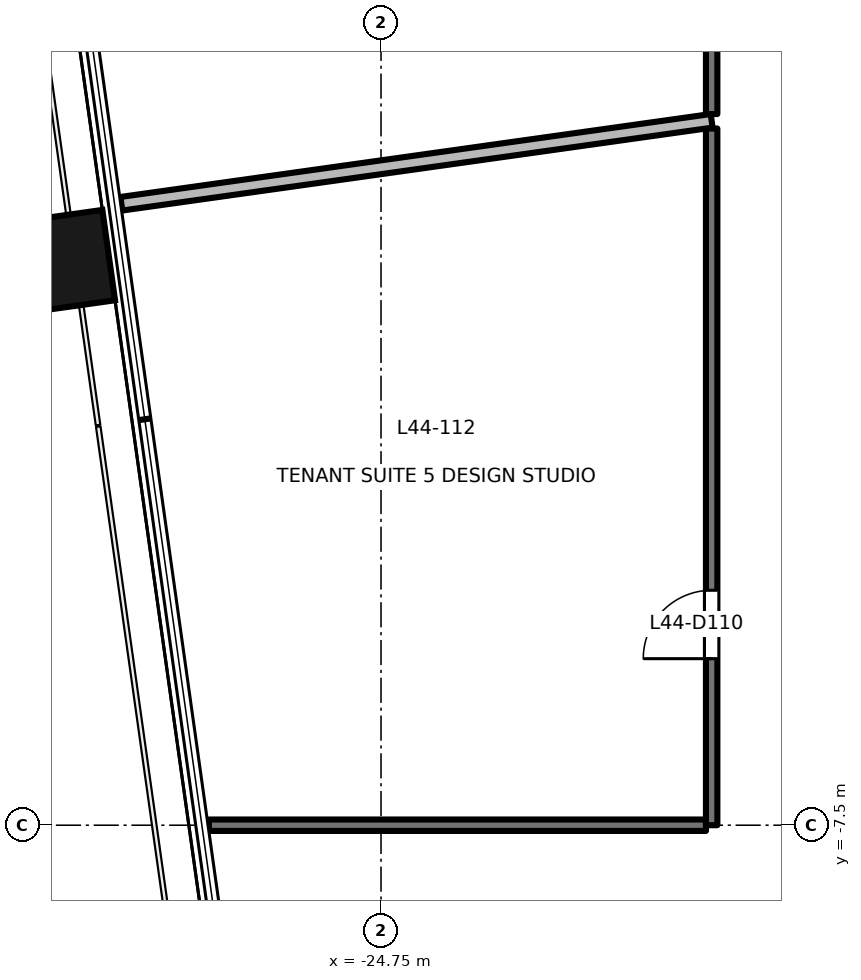
"""IFC4 building model, lengths in metres.
Left out: names, types, materials, properties, quantities, classifications, styles, units other than length and angle.
Written with IfcOpenShell. Run it as: python <this file> out.ifc"""

import sys

from ifc_helpers import new_model, si_unit, direction, frame, frame_2d, origin, origin_2d, place, context, subcontext, project, spatial, rectangle, extrude, element, fill, save


model = new_model("IFC4")
c1 = context("Model", 3, precision=1e-05, world=origin(), true_north=direction((0.0, 1.0)))
c2 = subcontext(c1, "Body", "Model", "MODEL_VIEW")
j1 = project(units=[si_unit("LENGTHUNIT", "METRE"), si_unit("PLANEANGLEUNIT", "RADIAN")], contexts=[c1])
p1 = place(None, origin())
s1 = spatial("IfcSite", under=j1, at=p1, CompositionType="ELEMENT")
p2 = place(p1, origin())
s2 = spatial("IfcBuilding", under=s1, at=p2, CompositionType="ELEMENT")
p3 = place(p2, frame((0.0, 0.0, 191.9)))
s3 = spatial("IfcBuildingStorey", under=s2, at=p3, CompositionType="ELEMENT", Elevation=191.9)
p4 = place(p3, frame((-29.224, -0.125, -0.2), z_axis=(0.0, 0.0, 1.0), x_axis=(-0.139190384377, 0.990265639562, 0.0)))
e1 = element("IfcColumn", 1, at=p4, inside=s3, PredefinedType="COLUMN", context=c2, shape_type="SweptSolid", body=[
    extrude(rectangle(XDim=1.2, YDim=1.8, at=origin_2d()), origin(), (0.0, 0.0, 1.0), 3.9),
])
p5 = place(p3, frame((-27.015, -7.5, 0.0), z_axis=(0.0, 0.0, 1.0), x_axis=(1.0, 0.0, 0.0)))
e2 = element("IfcWall", 2, at=p5, inside=s3, PredefinedType="PARTITIONING", context=c2, shape_type="SweptSolid", body=[
    extrude(rectangle(XDim=6.54, YDim=0.15, at=frame_2d((3.27, 0.0))), origin(), (0.0, 0.0, 1.0), 3.7),
])
p6 = place(p3, frame((-20.4, -7.5, 0.0), z_axis=(0.0, 0.0, 1.0), x_axis=(0.0, 1.0, 0.0)))
e3 = element("IfcWall", 3, at=p6, inside=s3, PredefinedType="PARTITIONING", context=c2, shape_type="SweptSolid", body=[
    extrude(rectangle(XDim=9.166, YDim=0.15, at=frame_2d((4.583, 0.0))), origin(), (0.0, 0.0, 1.0), 3.2),
])
p7 = place(p6, frame((2.191, 0.0, 0.0)))
e4 = element("IfcOpeningElement", 4, at=p7, cuts=e3, PredefinedType="OPENING", context=c2, shape_type="SweptSolid", body=[
    extrude(rectangle(XDim=0.9, YDim=2.1, at=frame_2d((0.45, 1.05))), frame((0.0, 0.085, 0.0), z_axis=(0.0, -1.0, 0.0), x_axis=(1.0, 0.0, 0.0)), (0.0, 0.0, 1.0), 0.171),
])
p8 = place(p3, frame((-20.4, 1.856, 0.0), z_axis=(0.0, 0.0, 1.0), x_axis=(0.0, 1.0, 0.0)))
e5 = element("IfcWall", 5, at=p8, inside=s3, PredefinedType="PARTITIONING", context=c2, shape_type="SweptSolid", body=[
    extrude(rectangle(XDim=3.644, YDim=0.15, at=frame_2d((1.822, 0.0))), origin(), (0.0, 0.0, 1.0), 3.2),
])
p9 = place(p8, frame((0.922, 0.0, 0.0)))
e6 = element("IfcOpeningElement", 6, at=p9, cuts=e5, PredefinedType="OPENING", context=c2, shape_type="SweptSolid", body=[
    extrude(rectangle(XDim=1.8, YDim=2.1, at=frame_2d((0.9, 1.05))), frame((0.0, 0.085, 0.0), z_axis=(0.0, -1.0, 0.0), x_axis=(1.0, 0.0, 0.0)), (0.0, 0.0, 1.0), 0.171),
])
p10 = place(p3, frame((-28.166, 0.676, 0.0), z_axis=(0.0, 0.0, 1.0), x_axis=(0.990274949164, 0.139124135423, 0.0)))
e7 = element("IfcWall", 7, at=p10, inside=s3, PredefinedType="PARTITIONING", context=c2, shape_type="SweptSolid", body=[
    extrude(rectangle(XDim=7.842, YDim=0.18, at=frame_2d((3.921, 0.0))), origin(), (0.0, 0.0, 1.0), 3.7),
])
p11 = place(p7, origin())
e8 = element("IfcDoor", 8, at=p11, inside=s3, OperationType="SINGLE_SWING_LEFT", PredefinedType="DOOR", context=c2, shape_type="SweptSolid", body=[
    extrude(rectangle(XDim=0.9, YDim=2.1, at=frame_2d((0.45, 1.05))), frame((0.0, 0.025, 0.0), z_axis=(0.0, -1.0, 0.0), x_axis=(1.0, 0.0, 0.0)), (0.0, 0.0, 1.0), 0.05),
])
fill(e4, e8)
save(model, sys.argv[1])
